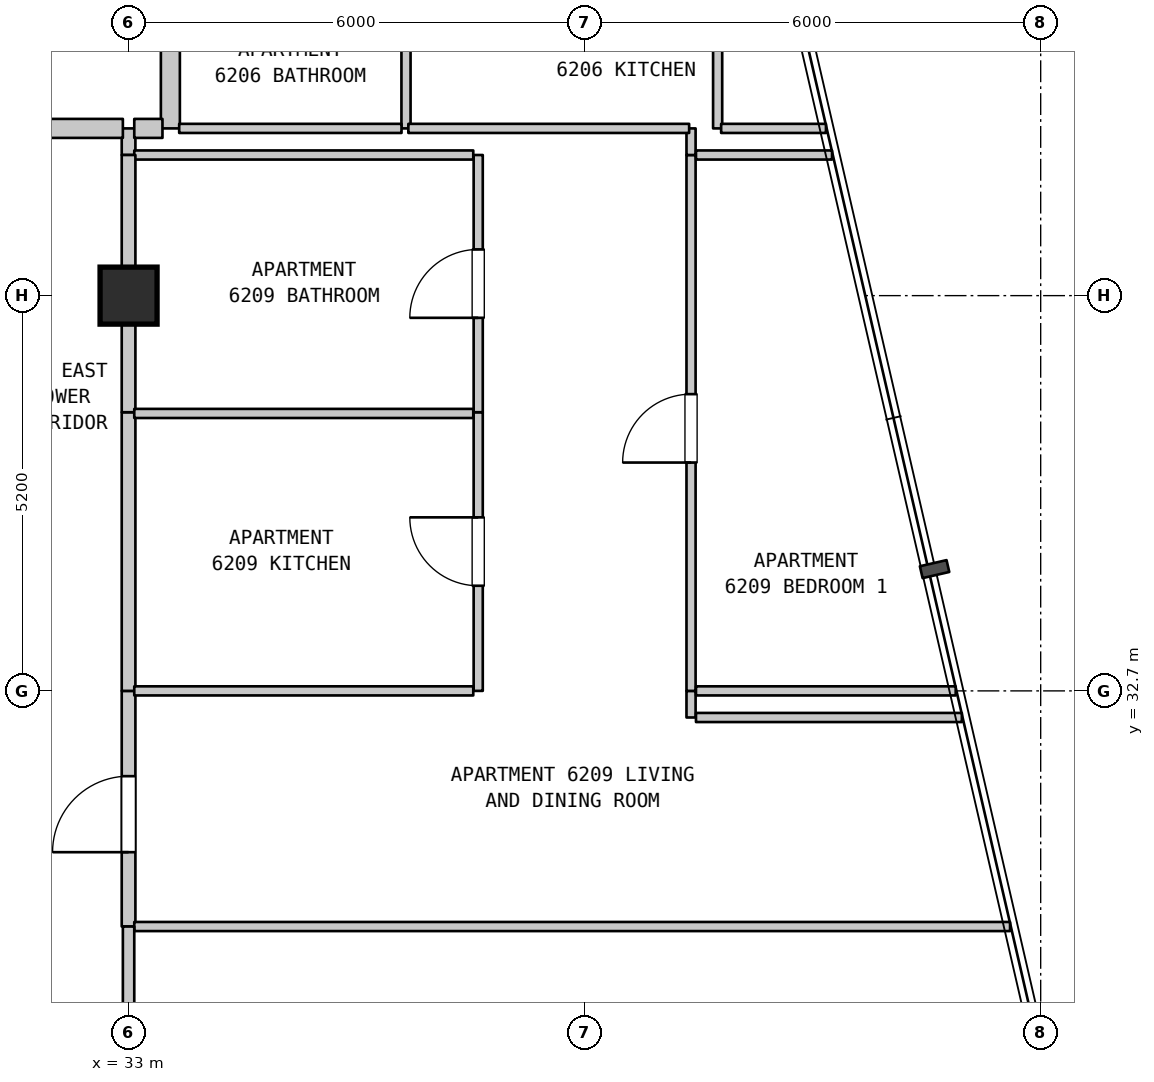
"""IFC4 building model, lengths in metres.
Left out: names, types, materials, properties, quantities, classifications, styles, units other than length and angle.
Written with IfcOpenShell. Run it as: python <this file> out.ifc"""

import sys

from ifc_helpers import new_model, si_unit, direction, frame, frame_2d, origin, origin_2d, place, context, subcontext, project, spatial, rectangle, extrude, element, fill, save


model = new_model("IFC4")
c1 = context("Model", 3, precision=1e-05, world=origin(), true_north=direction((0.0, 1.0)))
c2 = subcontext(c1, "Body", "Model", "MODEL_VIEW")
j1 = project(units=[si_unit("LENGTHUNIT", "METRE"), si_unit("PLANEANGLEUNIT", "RADIAN")], contexts=[c1])
p1 = place(None, origin())
s1 = spatial("IfcSite", under=j1, at=p1, CompositionType="ELEMENT")
p2 = place(p1, origin())
s2 = spatial("IfcBuilding", under=s1, at=p2, CompositionType="ELEMENT")
p3 = place(p2, frame((0.0, 0.0, 251.0)))
s3 = spatial("IfcBuildingStorey", under=s2, at=p3, CompositionType="ELEMENT", Elevation=251.0)
p4 = place(p3, frame((33.0, 37.9, 0.0), z_axis=(0.0, 0.0, 1.0), x_axis=(1.0, 0.0, 0.0)))
e1 = element("IfcColumn", 1, at=p4, inside=s3, PredefinedType="COLUMN", context=c2, shape_type="SweptSolid", body=[
    extrude(rectangle(XDim=0.75, YDim=0.75, at=origin_2d()), origin(), (0.0, 0.0, 1.0), 3.7),
])
p5 = place(p3, frame((33.0, 29.6, 0.0), z_axis=(0.0, 0.0, 1.0), x_axis=(0.0, 1.0, 0.0)))
e2 = element("IfcWall", 2, at=p5, inside=s3, PredefinedType="STANDARD", context=c2, shape_type="SweptSolid", body=[
    extrude(rectangle(XDim=3.1, YDim=0.18, at=frame_2d((1.55, 0.0))), origin(), (0.0, 0.0, 1.0), 2.89),
])
p6 = place(p5, frame((0.978, 0.0, 0.0)))
e3 = element("IfcOpeningElement", 3, at=p6, cuts=e2, PredefinedType="OPENING", context=c2, shape_type="SweptSolid", body=[
    extrude(rectangle(XDim=1.0, YDim=2.15, at=frame_2d((0.5, 1.075))), frame((0.0, 0.1, 0.0), z_axis=(0.0, -1.0, 0.0), x_axis=(1.0, 0.0, 0.0)), (0.0, 0.0, 1.0), 0.2),
])
p7 = place(p3, frame((33.0, 32.7, 0.0), z_axis=(0.0, 0.0, 1.0), x_axis=(0.0, 1.0, 0.0)))
e4 = element("IfcWall", 4, at=p7, inside=s3, PredefinedType="STANDARD", context=c2, shape_type="SweptSolid", body=[
    extrude(rectangle(XDim=3.666, YDim=0.18, at=frame_2d((1.833, 0.0))), origin(), (0.0, 0.0, 1.0), 2.89),
])
p8 = place(p3, frame((33.0, 36.366, 0.0), z_axis=(0.0, 0.0, 1.0), x_axis=(0.0, 1.0, 0.0)))
e5 = element("IfcWall", 5, at=p8, inside=s3, PredefinedType="STANDARD", context=c2, shape_type="SweptSolid", body=[
    extrude(rectangle(XDim=1.534, YDim=0.18, at=frame_2d((0.767, 0.0))), origin(), (0.0, 0.0, 1.0), 2.89),
])
p9 = place(p3, frame((33.0, 39.75, 0.0), z_axis=(0.0, 0.0, 1.0), x_axis=(0.0, 1.0, 0.0)))
e6 = element("IfcWall", 6, at=p9, inside=s3, PredefinedType="STANDARD", context=c2, shape_type="SweptSolid", body=[
    extrude(rectangle(XDim=0.35, YDim=0.18, at=frame_2d((0.175, 0.0))), origin(), (0.0, 0.0, 1.0), 3.39),
])
p10 = place(p3, frame((33.55, 40.1, 0.0), z_axis=(0.0, 0.0, 1.0), x_axis=(0.0, 1.0, 0.0)))
e7 = element("IfcWall", 7, at=p10, inside=s3, PredefinedType="STANDARD", context=c2, shape_type="SweptSolid", body=[
    extrude(rectangle(XDim=2.3, YDim=0.25, at=frame_2d((1.15, 0.0))), origin(), (0.0, 0.0, 1.0), 3.39),
])
p11 = place(p3, frame((36.65, 40.1, 0.0), z_axis=(0.0, 0.0, 1.0), x_axis=(0.0, 1.0, 0.0)))
e8 = element("IfcWall", 8, at=p11, inside=s3, PredefinedType="PARTITIONING", context=c2, shape_type="SweptSolid", body=[
    extrude(rectangle(XDim=2.3, YDim=0.12, at=frame_2d((1.15, 0.0))), origin(), (0.0, 0.0, 1.0), 3.39),
])
p12 = place(p3, frame((37.6, 32.7, 0.0), z_axis=(0.0, 0.0, 1.0), x_axis=(0.0, 1.0, 0.0)))
e9 = element("IfcWall", 9, at=p12, inside=s3, PredefinedType="PARTITIONING", context=c2, shape_type="SweptSolid", body=[
    extrude(rectangle(XDim=3.666, YDim=0.12, at=frame_2d((1.833, 0.0))), origin(), (0.0, 0.0, 1.0), 3.39),
])
p13 = place(p12, frame((1.383, 0.0, 0.0)))
e10 = element("IfcOpeningElement", 10, at=p13, cuts=e9, PredefinedType="OPENING", context=c2, shape_type="SweptSolid", body=[
    extrude(rectangle(XDim=0.9, YDim=2.15, at=frame_2d((0.45, 1.075))), frame((0.0, 0.07, 0.0), z_axis=(0.0, -1.0, 0.0), x_axis=(1.0, 0.0, 0.0)), (0.0, 0.0, 1.0), 0.14),
])
p14 = place(p3, frame((37.6, 36.366, 0.0), z_axis=(0.0, 0.0, 1.0), x_axis=(0.0, 1.0, 0.0)))
e11 = element("IfcWall", 11, at=p14, inside=s3, PredefinedType="PARTITIONING", context=c2, shape_type="SweptSolid", body=[
    extrude(rectangle(XDim=3.384, YDim=0.12, at=frame_2d((1.692, 0.0))), origin(), (0.0, 0.0, 1.0), 3.39),
])
p15 = place(p14, frame((1.242, 0.0, 0.0)))
e12 = element("IfcOpeningElement", 12, at=p15, cuts=e11, PredefinedType="OPENING", context=c2, shape_type="SweptSolid", body=[
    extrude(rectangle(XDim=0.9, YDim=2.1, at=frame_2d((0.45, 1.05))), frame((0.0, 0.07, 0.0), z_axis=(0.0, -1.0, 0.0), x_axis=(1.0, 0.0, 0.0)), (0.0, 0.0, 1.0), 0.14),
])
p16 = place(p3, frame((40.4, 32.35, 0.0), z_axis=(0.0, 0.0, 1.0), x_axis=(0.0, 1.0, 0.0)))
e13 = element("IfcWall", 13, at=p16, inside=s3, PredefinedType="PARTITIONING", context=c2, shape_type="SweptSolid", body=[
    extrude(rectangle(XDim=0.35, YDim=0.12, at=frame_2d((0.175, 0.0))), origin(), (0.0, 0.0, 1.0), 3.39),
])
p17 = place(p3, frame((40.4, 32.7, 0.0), z_axis=(0.0, 0.0, 1.0), x_axis=(0.0, 1.0, 0.0)))
e14 = element("IfcWall", 14, at=p17, inside=s3, PredefinedType="PARTITIONING", context=c2, shape_type="SweptSolid", body=[
    extrude(rectangle(XDim=7.05, YDim=0.12, at=frame_2d((3.525, 0.0))), origin(), (0.0, 0.0, 1.0), 3.39),
])
p18 = place(p17, frame((3.004, 0.0, 0.0)))
e15 = element("IfcOpeningElement", 15, at=p18, cuts=e14, PredefinedType="OPENING", context=c2, shape_type="SweptSolid", body=[
    extrude(rectangle(XDim=0.9, YDim=2.15, at=frame_2d((0.45, 1.075))), frame((0.0, 0.07, 0.0), z_axis=(0.0, -1.0, 0.0), x_axis=(1.0, 0.0, 0.0)), (0.0, 0.0, 1.0), 0.14),
])
p19 = place(p3, frame((40.4, 39.75, 0.0), z_axis=(0.0, 0.0, 1.0), x_axis=(0.0, 1.0, 0.0)))
e16 = element("IfcWall", 16, at=p19, inside=s3, PredefinedType="PARTITIONING", context=c2, shape_type="SweptSolid", body=[
    extrude(rectangle(XDim=0.35, YDim=0.12, at=frame_2d((0.175, 0.0))), origin(), (0.0, 0.0, 1.0), 3.39),
])
p20 = place(p3, frame((40.75, 40.1, 0.0), z_axis=(0.0, 0.0, 1.0), x_axis=(0.0, 1.0, 0.0)))
e17 = element("IfcWall", 17, at=p20, inside=s3, PredefinedType="PARTITIONING", context=c2, shape_type="SweptSolid", body=[
    extrude(rectangle(XDim=2.3, YDim=0.12, at=frame_2d((1.15, 0.0))), origin(), (0.0, 0.0, 1.0), 3.39),
])
p21 = place(p3, frame((33.075, 29.6, 0.0), z_axis=(0.0, 0.0, 1.0), x_axis=(1.0, 0.0, 0.0)))
e18 = element("IfcWall", 18, at=p21, inside=s3, PredefinedType="PARTITIONING", context=c2, shape_type="SweptSolid", body=[
    extrude(rectangle(XDim=11.522, YDim=0.12, at=frame_2d((5.761, 0.0))), origin(), (0.0, 0.0, 1.0), 3.39),
])
p22 = place(p3, frame((40.465, 32.35, 0.0), z_axis=(0.0, 0.0, 1.0), x_axis=(1.0, 0.0, 0.0)))
e19 = element("IfcWall", 19, at=p22, inside=s3, PredefinedType="PARTITIONING", context=c2, shape_type="SweptSolid", body=[
    extrude(rectangle(XDim=3.498, YDim=0.12, at=frame_2d((1.749, 0.0))), origin(), (0.0, 0.0, 1.0), 3.39),
])
p23 = place(p3, frame((33.075, 32.7, 0.0), z_axis=(0.0, 0.0, 1.0), x_axis=(1.0, 0.0, 0.0)))
e20 = element("IfcWall", 20, at=p23, inside=s3, PredefinedType="PARTITIONING", context=c2, shape_type="SweptSolid", body=[
    extrude(rectangle(XDim=4.46, YDim=0.12, at=frame_2d((2.23, 0.0))), origin(), (0.0, 0.0, 1.0), 3.39),
])
p24 = place(p3, frame((40.465, 32.7, 0.0), z_axis=(0.0, 0.0, 1.0), x_axis=(1.0, 0.0, 0.0)))
e21 = element("IfcWall", 21, at=p24, inside=s3, PredefinedType="PARTITIONING", context=c2, shape_type="SweptSolid", body=[
    extrude(rectangle(XDim=3.417, YDim=0.12, at=frame_2d((1.708, 0.0))), origin(), (0.0, 0.0, 1.0), 3.39),
])
for number, where, z_axis, x_axis in (
    (22, (33.075, 36.35, 0.0), (0.0, 0.0, 1.0), (1.0, 0.0, 0.0)),
    (23, (33.075, 39.75, 0.0), (0.0, 0.0, 1.0), (1.0, 0.0, 0.0)),
):
    element("IfcWall", number, at=place(p3, frame(where, z_axis=z_axis, x_axis=x_axis)), inside=s3, PredefinedType="PARTITIONING", context=c2, shape_type="SweptSolid", body=[
        extrude(rectangle(XDim=4.46, YDim=0.12, at=frame_2d((2.23, 0.0))), origin(), (0.0, 0.0, 1.0), 3.39),
    ])
p25 = place(p3, frame((40.465, 39.75, 0.0), z_axis=(0.0, 0.0, 1.0), x_axis=(1.0, 0.0, 0.0)))
e24 = element("IfcWall", 24, at=p25, inside=s3, PredefinedType="PARTITIONING", context=c2, shape_type="SweptSolid", body=[
    extrude(rectangle(XDim=1.79, YDim=0.12, at=frame_2d((0.895, 0.0))), origin(), (0.0, 0.0, 1.0), 3.39),
])
p26 = place(p3, frame((29.86, 40.1, 0.0), z_axis=(0.0, 0.0, 1.0), x_axis=(1.0, 0.0, 0.0)))
e25 = element("IfcWall", 25, at=p26, inside=s3, PredefinedType="STANDARD", context=c2, shape_type="SweptSolid", body=[
    extrude(rectangle(XDim=3.065, YDim=0.25, at=frame_2d((1.532, 0.0))), origin(), (0.0, 0.0, 1.0), 3.39),
])
p27 = place(p3, frame((33.075, 40.1, 0.0), z_axis=(0.0, 0.0, 1.0), x_axis=(1.0, 0.0, 0.0)))
e26 = element("IfcWall", 26, at=p27, inside=s3, PredefinedType="STANDARD", context=c2, shape_type="SweptSolid", body=[
    extrude(rectangle(XDim=0.371, YDim=0.25, at=frame_2d((0.186, 0.0))), origin(), (0.0, 0.0, 1.0), 3.39),
])
p28 = place(p3, frame((33.666, 40.1, 0.0), z_axis=(0.0, 0.0, 1.0), x_axis=(1.0, 0.0, 0.0)))
e27 = element("IfcWall", 27, at=p28, inside=s3, PredefinedType="PARTITIONING", context=c2, shape_type="SweptSolid", body=[
    extrude(rectangle(XDim=2.925, YDim=0.12, at=frame_2d((1.462, 0.0))), origin(), (0.0, 0.0, 1.0), 3.39),
])
p29 = place(p3, frame((36.681, 40.1, 0.0), z_axis=(0.0, 0.0, 1.0), x_axis=(1.0, 0.0, 0.0)))
e28 = element("IfcWall", 28, at=p29, inside=s3, PredefinedType="PARTITIONING", context=c2, shape_type="SweptSolid", body=[
    extrude(rectangle(XDim=3.694, YDim=0.12, at=frame_2d((1.847, 0.0))), origin(), (0.0, 0.0, 1.0), 3.39),
])
p30 = place(p3, frame((40.796, 40.1, 0.0), z_axis=(0.0, 0.0, 1.0), x_axis=(1.0, 0.0, 0.0)))
e29 = element("IfcWall", 29, at=p30, inside=s3, PredefinedType="PARTITIONING", context=c2, shape_type="SweptSolid", body=[
    extrude(rectangle(XDim=1.379, YDim=0.12, at=frame_2d((0.689, 0.0))), origin(), (0.0, 0.0, 1.0), 3.39),
])
p31 = place(p3, frame((33.0, 27.9, 0.0), z_axis=(0.0, 0.0, 1.0), x_axis=(0.0, 1.0, 0.0)))
e30 = element("IfcWall", 30, at=p31, inside=s3, PredefinedType="STANDARD", context=c2, shape_type="SweptSolid", body=[
    extrude(rectangle(XDim=1.7, YDim=0.15, at=frame_2d((0.85, 0.0))), origin(), (0.0, 0.0, 1.0), 2.89),
])
p32 = place(p3, frame((33.0, 37.9, 0.0), z_axis=(0.0, 0.0, 1.0), x_axis=(0.0, 1.0, 0.0)))
e31 = element("IfcWall", 31, at=p32, inside=s3, PredefinedType="STANDARD", context=c2, shape_type="SweptSolid", body=[
    extrude(rectangle(XDim=1.85, YDim=0.18, at=frame_2d((0.925, 0.0))), origin(), (0.0, 0.0, 1.0), 2.79),
])
p33 = place(p6, origin())
e32 = element("IfcDoor", 32, at=p33, inside=s3, OperationType="SINGLE_SWING_LEFT", PredefinedType="DOOR", context=c2, shape_type="SweptSolid", body=[
    extrude(rectangle(XDim=1.0, YDim=2.15, at=frame_2d((0.5, 1.075))), frame((0.0, 0.025, 0.0), z_axis=(0.0, -1.0, 0.0), x_axis=(1.0, 0.0, 0.0)), (0.0, 0.0, 1.0), 0.05),
])
fill(e3, e32)
p34 = place(p13, origin())
e33 = element("IfcDoor", 33, at=p34, inside=s3, OperationType="SINGLE_SWING_RIGHT", PredefinedType="DOOR", context=c2, shape_type="SweptSolid", body=[
    extrude(rectangle(XDim=0.9, YDim=2.15, at=frame_2d((0.45, 1.075))), frame((0.0, 0.025, 0.0), z_axis=(0.0, -1.0, 0.0), x_axis=(1.0, 0.0, 0.0)), (0.0, 0.0, 1.0), 0.05),
])
fill(e10, e33)
p35 = place(p15, origin())
e34 = element("IfcDoor", 34, at=p35, inside=s3, OperationType="SINGLE_SWING_LEFT", PredefinedType="DOOR", context=c2, shape_type="SweptSolid", body=[
    extrude(rectangle(XDim=0.9, YDim=2.1, at=frame_2d((0.45, 1.05))), frame((0.0, 0.025, 0.0), z_axis=(0.0, -1.0, 0.0), x_axis=(1.0, 0.0, 0.0)), (0.0, 0.0, 1.0), 0.05),
])
fill(e12, e34)
p36 = place(p18, origin())
e35 = element("IfcDoor", 35, at=p36, inside=s3, OperationType="SINGLE_SWING_LEFT", PredefinedType="DOOR", context=c2, shape_type="SweptSolid", body=[
    extrude(rectangle(XDim=0.9, YDim=2.15, at=frame_2d((0.45, 1.075))), frame((0.0, 0.025, 0.0), z_axis=(0.0, -1.0, 0.0), x_axis=(1.0, 0.0, 0.0)), (0.0, 0.0, 1.0), 0.05),
])
fill(e15, e35)
save(model, sys.argv[1])
